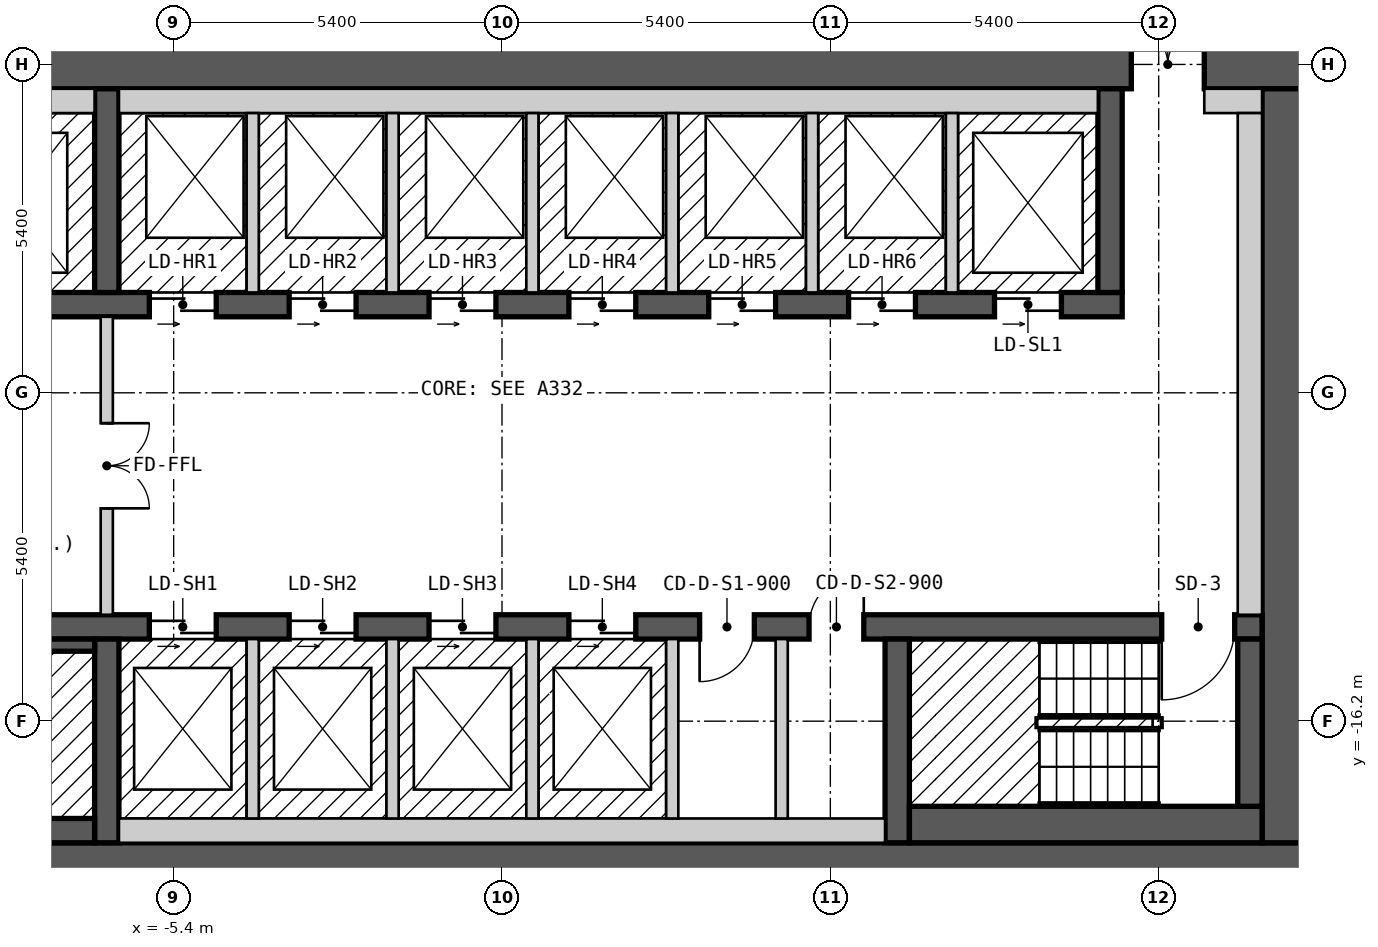
"""IFC4 building model, lengths in metres.
Left out: names, types, materials, properties, quantities, classifications, styles, units other than length and angle.
Written with IfcOpenShell. Run it as: python <this file> out.ifc"""

import sys

from ifc_helpers import new_model, si_unit, direction, frame, frame_2d, origin, place, context, subcontext, project, spatial, rectangle, extrude, element, fill, save


model = new_model("IFC4")
c1 = context("Model", 3, precision=1e-05, world=origin(), true_north=direction((0.0, 1.0)))
c2 = subcontext(c1, "Body", "Model", "MODEL_VIEW")
j1 = project(units=[si_unit("LENGTHUNIT", "METRE"), si_unit("PLANEANGLEUNIT", "RADIAN")], contexts=[c1])
p1 = place(None, origin())
s1 = spatial("IfcSite", under=j1, at=p1, CompositionType="ELEMENT")
p2 = place(p1, origin())
s2 = spatial("IfcBuilding", under=s1, at=p2, CompositionType="ELEMENT")
p3 = place(p2, frame((0.0, 0.0, 111.6)))
s3 = spatial("IfcBuildingStorey", under=s2, at=p3, CompositionType="ELEMENT", Elevation=111.6)
p4 = place(p3, frame((-13.3, -18.6, 0.0), z_axis=(0.0, 0.0, 1.0), x_axis=(1.0, 0.0, 0.0)))
e1 = element("IfcWall", 1, at=p4, inside=s3, PredefinedType="SHEAR", context=c2, shape_type="SweptSolid", body=[
    extrude(rectangle(XDim=26.6, YDim=0.8, at=frame_2d((13.3, 0.0))), origin(), (0.0, 0.0, 1.0), 5.7),
])
p5 = place(p3, frame((-13.3, -5.4, 0.0), z_axis=(0.0, 0.0, 1.0), x_axis=(1.0, 0.0, 0.0)))
e2 = element("IfcWall", 2, at=p5, inside=s3, PredefinedType="SHEAR", context=c2, shape_type="SweptSolid", body=[
    extrude(rectangle(XDim=26.6, YDim=0.8, at=frame_2d((13.3, 0.0))), origin(), (0.0, 0.0, 1.0), 5.7),
])
p6 = place(p5, frame((23.65, 0.0, 0.0)))
e3 = element("IfcOpeningElement", 3, at=p6, cuts=e2, PredefinedType="OPENING", context=c2, shape_type="SweptSolid", body=[
    extrude(rectangle(XDim=1.2, YDim=2.1, at=frame_2d((0.6, 1.05))), frame((0.0, 0.41, 0.0), z_axis=(0.0, -1.0, 0.0), x_axis=(1.0, 0.0, 0.0)), (0.0, 0.0, 1.0), 0.82),
])
p7 = place(p3, frame((12.9, -18.2, 0.0), z_axis=(0.0, 0.0, 1.0), x_axis=(0.0, 1.0, 0.0)))
e4 = element("IfcWall", 4, at=p7, inside=s3, PredefinedType="SHEAR", context=c2, shape_type="SweptSolid", body=[
    extrude(rectangle(XDim=12.4, YDim=0.8, at=frame_2d((6.2, 0.0))), origin(), (0.0, 0.0, 1.0), 5.7),
])
p8 = place(p3, frame((-12.5, -14.65, 0.0), z_axis=(0.0, 0.0, 1.0), x_axis=(1.0, 0.0, 0.0)))
e5 = element("IfcWall", 5, at=p8, inside=s3, PredefinedType="SHEAR", context=c2, shape_type="SweptSolid", body=[
    extrude(rectangle(XDim=25.0, YDim=0.4, at=frame_2d((12.5, 0.0))), origin(), (0.0, 0.0, 1.0), 5.7),
])
p9 = place(p8, frame((6.7, 0.0, 0.0)))
e6 = element("IfcOpeningElement", 6, at=p9, cuts=e5, PredefinedType="OPENING", context=c2, shape_type="SweptSolid", body=[
    extrude(rectangle(XDim=1.1, YDim=2.1, at=frame_2d((0.55, 1.05))), frame((0.0, 0.21, 0.0), z_axis=(0.0, -1.0, 0.0), x_axis=(1.0, 0.0, 0.0)), (0.0, 0.0, 1.0), 0.42),
])
p10 = place(p8, frame((9.0, 0.0, 0.0)))
e7 = element("IfcOpeningElement", 7, at=p10, cuts=e5, PredefinedType="OPENING", context=c2, shape_type="SweptSolid", body=[
    extrude(rectangle(XDim=1.1, YDim=2.1, at=frame_2d((0.55, 1.05))), frame((0.0, 0.21, 0.0), z_axis=(0.0, -1.0, 0.0), x_axis=(1.0, 0.0, 0.0)), (0.0, 0.0, 1.0), 0.42),
])
p11 = place(p8, frame((11.3, 0.0, 0.0)))
e8 = element("IfcOpeningElement", 8, at=p11, cuts=e5, PredefinedType="OPENING", context=c2, shape_type="SweptSolid", body=[
    extrude(rectangle(XDim=1.1, YDim=2.1, at=frame_2d((0.55, 1.05))), frame((0.0, 0.21, 0.0), z_axis=(0.0, -1.0, 0.0), x_axis=(1.0, 0.0, 0.0)), (0.0, 0.0, 1.0), 0.42),
])
p12 = place(p8, frame((13.6, 0.0, 0.0)))
e9 = element("IfcOpeningElement", 9, at=p12, cuts=e5, PredefinedType="OPENING", context=c2, shape_type="SweptSolid", body=[
    extrude(rectangle(XDim=1.1, YDim=2.1, at=frame_2d((0.55, 1.05))), frame((0.0, 0.21, 0.0), z_axis=(0.0, -1.0, 0.0), x_axis=(1.0, 0.0, 0.0)), (0.0, 0.0, 1.0), 0.42),
])
p13 = place(p8, frame((1.7, 0.0, 0.0), z_axis=(0.0, 0.0, 1.0), x_axis=(-1.0, 0.0, 0.0)))
e10 = element("IfcOpeningElement", 10, at=p13, cuts=e5, PredefinedType="OPENING", context=c2, shape_type="SweptSolid", body=[
    extrude(rectangle(XDim=1.2, YDim=2.1, at=frame_2d((0.6, 1.05))), frame((0.0, 0.21, 0.0), z_axis=(0.0, -1.0, 0.0), x_axis=(1.0, 0.0, 0.0)), (0.0, 0.0, 1.0), 0.42),
])
p14 = place(p8, frame((24.55, 0.0, 0.0), z_axis=(0.0, 0.0, 1.0), x_axis=(-1.0, 0.0, 0.0)))
e11 = element("IfcOpeningElement", 11, at=p14, cuts=e5, PredefinedType="OPENING", context=c2, shape_type="SweptSolid", body=[
    extrude(rectangle(XDim=1.2, YDim=2.1, at=frame_2d((0.6, 1.05))), frame((0.0, 0.21, 0.0), z_axis=(0.0, -1.0, 0.0), x_axis=(1.0, 0.0, 0.0)), (0.0, 0.0, 1.0), 0.42),
])
p15 = place(p8, frame((16.65, 0.0, 0.0), z_axis=(0.0, 0.0, 1.0), x_axis=(-1.0, 0.0, 0.0)))
e12 = element("IfcOpeningElement", 12, at=p15, cuts=e5, PredefinedType="OPENING", context=c2, shape_type="SweptSolid", body=[
    extrude(rectangle(XDim=0.9, YDim=2.1, at=frame_2d((0.45, 1.05))), frame((0.0, 0.21, 0.0), z_axis=(0.0, -1.0, 0.0), x_axis=(1.0, 0.0, 0.0)), (0.0, 0.0, 1.0), 0.42),
])
p16 = place(p8, frame((18.45, 0.0, 0.0), z_axis=(0.0, 0.0, 1.0), x_axis=(-1.0, 0.0, 0.0)))
e13 = element("IfcOpeningElement", 13, at=p16, cuts=e5, PredefinedType="OPENING", context=c2, shape_type="SweptSolid", body=[
    extrude(rectangle(XDim=0.9, YDim=2.1, at=frame_2d((0.45, 1.05))), frame((0.0, 0.21, 0.0), z_axis=(0.0, -1.0, 0.0), x_axis=(1.0, 0.0, 0.0)), (0.0, 0.0, 1.0), 0.42),
])
p17 = place(p3, frame((-12.5, -9.35, 0.0), z_axis=(0.0, 0.0, 1.0), x_axis=(1.0, 0.0, 0.0)))
e14 = element("IfcWall", 14, at=p17, inside=s3, PredefinedType="SHEAR", context=c2, shape_type="SweptSolid", body=[
    extrude(rectangle(XDim=22.7, YDim=0.4, at=frame_2d((11.35, 0.0))), origin(), (0.0, 0.0, 1.0), 5.7),
])
p18 = place(p17, frame((1.1, 0.0, 0.0)))
e15 = element("IfcOpeningElement", 15, at=p18, cuts=e14, PredefinedType="OPENING", context=c2, shape_type="SweptSolid", body=[
    extrude(rectangle(XDim=1.1, YDim=2.1, at=frame_2d((0.55, 1.05))), frame((0.0, 0.21, 0.0), z_axis=(0.0, -1.0, 0.0), x_axis=(1.0, 0.0, 0.0)), (0.0, 0.0, 1.0), 0.42),
])
p19 = place(p17, frame((3.9, 0.0, 0.0)))
e16 = element("IfcOpeningElement", 16, at=p19, cuts=e14, PredefinedType="OPENING", context=c2, shape_type="SweptSolid", body=[
    extrude(rectangle(XDim=1.1, YDim=2.1, at=frame_2d((0.55, 1.05))), frame((0.0, 0.21, 0.0), z_axis=(0.0, -1.0, 0.0), x_axis=(1.0, 0.0, 0.0)), (0.0, 0.0, 1.0), 0.42),
])
p20 = place(p17, frame((6.7, 0.0, 0.0)))
e17 = element("IfcOpeningElement", 17, at=p20, cuts=e14, PredefinedType="OPENING", context=c2, shape_type="SweptSolid", body=[
    extrude(rectangle(XDim=1.1, YDim=2.1, at=frame_2d((0.55, 1.05))), frame((0.0, 0.21, 0.0), z_axis=(0.0, -1.0, 0.0), x_axis=(1.0, 0.0, 0.0)), (0.0, 0.0, 1.0), 0.42),
])
p21 = place(p17, frame((9.0, 0.0, 0.0)))
e18 = element("IfcOpeningElement", 18, at=p21, cuts=e14, PredefinedType="OPENING", context=c2, shape_type="SweptSolid", body=[
    extrude(rectangle(XDim=1.1, YDim=2.1, at=frame_2d((0.55, 1.05))), frame((0.0, 0.21, 0.0), z_axis=(0.0, -1.0, 0.0), x_axis=(1.0, 0.0, 0.0)), (0.0, 0.0, 1.0), 0.42),
])
p22 = place(p17, frame((11.3, 0.0, 0.0)))
e19 = element("IfcOpeningElement", 19, at=p22, cuts=e14, PredefinedType="OPENING", context=c2, shape_type="SweptSolid", body=[
    extrude(rectangle(XDim=1.1, YDim=2.1, at=frame_2d((0.55, 1.05))), frame((0.0, 0.21, 0.0), z_axis=(0.0, -1.0, 0.0), x_axis=(1.0, 0.0, 0.0)), (0.0, 0.0, 1.0), 0.42),
])
p23 = place(p17, frame((13.6, 0.0, 0.0)))
e20 = element("IfcOpeningElement", 20, at=p23, cuts=e14, PredefinedType="OPENING", context=c2, shape_type="SweptSolid", body=[
    extrude(rectangle(XDim=1.1, YDim=2.1, at=frame_2d((0.55, 1.05))), frame((0.0, 0.21, 0.0), z_axis=(0.0, -1.0, 0.0), x_axis=(1.0, 0.0, 0.0)), (0.0, 0.0, 1.0), 0.42),
])
p24 = place(p17, frame((15.9, 0.0, 0.0)))
e21 = element("IfcOpeningElement", 21, at=p24, cuts=e14, PredefinedType="OPENING", context=c2, shape_type="SweptSolid", body=[
    extrude(rectangle(XDim=1.1, YDim=2.1, at=frame_2d((0.55, 1.05))), frame((0.0, 0.21, 0.0), z_axis=(0.0, -1.0, 0.0), x_axis=(1.0, 0.0, 0.0)), (0.0, 0.0, 1.0), 0.42),
])
p25 = place(p17, frame((18.2, 0.0, 0.0)))
e22 = element("IfcOpeningElement", 22, at=p25, cuts=e14, PredefinedType="OPENING", context=c2, shape_type="SweptSolid", body=[
    extrude(rectangle(XDim=1.1, YDim=2.1, at=frame_2d((0.55, 1.05))), frame((0.0, 0.21, 0.0), z_axis=(0.0, -1.0, 0.0), x_axis=(1.0, 0.0, 0.0)), (0.0, 0.0, 1.0), 0.42),
])
p26 = place(p17, frame((20.6, 0.0, 0.0)))
e23 = element("IfcOpeningElement", 23, at=p26, cuts=e14, PredefinedType="OPENING", context=c2, shape_type="SweptSolid", body=[
    extrude(rectangle(XDim=1.1, YDim=2.1, at=frame_2d((0.55, 1.05))), frame((0.0, 0.21, 0.0), z_axis=(0.0, -1.0, 0.0), x_axis=(1.0, 0.0, 0.0)), (0.0, 0.0, 1.0), 0.42),
])
for number, where, z_axis, x_axis in (
    (24, (-6.5, -18.2, 0.0), (0.0, 0.0, 1.0), (0.0, 1.0, 0.0)),
    (25, (6.5, -18.2, 0.0), (0.0, 0.0, 1.0), (0.0, 1.0, 0.0)),
    (26, (-6.5, -9.15, 0.0), (0.0, 0.0, 1.0), (0.0, 1.0, 0.0)),
    (27, (10.0, -9.15, 0.0), (0.0, 0.0, 1.0), (0.0, 1.0, 0.0)),
):
    element("IfcWall", number, at=place(p3, frame(where, z_axis=z_axis, x_axis=x_axis)), inside=s3, PredefinedType="SHEAR", context=c2, shape_type="SweptSolid", body=[
        extrude(rectangle(XDim=3.35, YDim=0.4, at=frame_2d((1.675, 0.0))), origin(), (0.0, 0.0, 1.0), 5.7),
    ])
for number, where, z_axis, x_axis in (
    (28, (-12.1, -18.0, 0.0), (0.0, 0.0, 1.0), (1.0, 0.0, 0.0)),
    (29, (-12.1, -6.0, 0.0), (0.0, 0.0, 1.0), (1.0, 0.0, 0.0)),
):
    element("IfcWall", number, at=place(p3, frame(where, z_axis=z_axis, x_axis=x_axis)), inside=s3, PredefinedType="SOLIDWALL", context=c2, shape_type="SweptSolid", body=[
        extrude(rectangle(XDim=5.4, YDim=0.4, at=frame_2d((2.7, 0.0))), origin(), (0.0, 0.0, 1.0), 5.7),
    ])
p27 = place(p3, frame((-10.8, -14.95, 0.0), z_axis=(0.0, 0.0, 1.0), x_axis=(1.0, 0.0, 0.0)))
e30 = element("IfcWall", 30, at=p27, inside=s3, PredefinedType="SOLIDWALL", context=c2, shape_type="SweptSolid", body=[
    extrude(rectangle(XDim=4.1, YDim=0.2, at=frame_2d((2.05, 0.0))), origin(), (0.0, 0.0, 1.0), 5.7),
])
p28 = place(p3, frame((-6.5, -14.45, 0.0), z_axis=(0.0, 0.0, 1.0), x_axis=(0.0, 1.0, 0.0)))
e31 = element("IfcWall", 31, at=p28, inside=s3, PredefinedType="PARTITIONING", context=c2, shape_type="SweptSolid", body=[
    extrude(rectangle(XDim=4.9, YDim=0.2, at=frame_2d((2.45, 0.0))), origin(), (0.0, 0.0, 1.0), 5.7),
])
p29 = place(p28, frame((3.15, 0.0, 0.0), z_axis=(0.0, 0.0, 1.0), x_axis=(-1.0, 0.0, 0.0)))
e32 = element("IfcOpeningElement", 32, at=p29, cuts=e31, PredefinedType="OPENING", context=c2, shape_type="SweptSolid", body=[
    extrude(rectangle(XDim=1.4, YDim=2.1, at=frame_2d((0.7, 1.05))), frame((0.0, 0.11, 0.0), z_axis=(0.0, -1.0, 0.0), x_axis=(1.0, 0.0, 0.0)), (0.0, 0.0, 1.0), 0.22),
])
p30 = place(p3, frame((-6.3, -18.0, 0.0), z_axis=(0.0, 0.0, 1.0), x_axis=(1.0, 0.0, 0.0)))
e33 = element("IfcWall", 33, at=p30, inside=s3, PredefinedType="SOLIDWALL", context=c2, shape_type="SweptSolid", body=[
    extrude(rectangle(XDim=12.6, YDim=0.4, at=frame_2d((6.3, 0.0))), origin(), (0.0, 0.0, 1.0), 5.7),
])
p31 = place(p3, frame((-6.3, -6.0, 0.0), z_axis=(0.0, 0.0, 1.0), x_axis=(1.0, 0.0, 0.0)))
e34 = element("IfcWall", 34, at=p31, inside=s3, PredefinedType="SOLIDWALL", context=c2, shape_type="SweptSolid", body=[
    extrude(rectangle(XDim=16.1, YDim=0.4, at=frame_2d((8.05, 0.0))), origin(), (0.0, 0.0, 1.0), 5.7),
])
for number, where, z_axis, x_axis in (
    (35, (-4.1, -17.8, 0.0), (0.0, 0.0, 1.0), (0.0, 1.0, 0.0)),
    (36, (-4.1, -9.15, 0.0), (0.0, 0.0, 1.0), (0.0, 1.0, 0.0)),
    (37, (-1.8, -17.8, 0.0), (0.0, 0.0, 1.0), (0.0, 1.0, 0.0)),
    (38, (-1.8, -9.15, 0.0), (0.0, 0.0, 1.0), (0.0, 1.0, 0.0)),
    (39, (0.5, -17.8, 0.0), (0.0, 0.0, 1.0), (0.0, 1.0, 0.0)),
    (40, (0.5, -9.15, 0.0), (0.0, 0.0, 1.0), (0.0, 1.0, 0.0)),
    (41, (2.8, -17.8, 0.0), (0.0, 0.0, 1.0), (0.0, 1.0, 0.0)),
    (42, (2.8, -9.15, 0.0), (0.0, 0.0, 1.0), (0.0, 1.0, 0.0)),
):
    element("IfcWall", number, at=place(p3, frame(where, z_axis=z_axis, x_axis=x_axis)), inside=s3, PredefinedType="SOLIDWALL", context=c2, shape_type="SweptSolid", body=[
        extrude(rectangle(XDim=2.95, YDim=0.2, at=frame_2d((1.475, 0.0))), origin(), (0.0, 0.0, 1.0), 5.7),
    ])
p32 = place(p3, frame((4.6, -17.8, 0.0), z_axis=(0.0, 0.0, 1.0), x_axis=(0.0, 1.0, 0.0)))
e43 = element("IfcWall", 43, at=p32, inside=s3, PredefinedType="PARTITIONING", context=c2, shape_type="SweptSolid", body=[
    extrude(rectangle(XDim=2.95, YDim=0.2, at=frame_2d((1.475, 0.0))), origin(), (0.0, 0.0, 1.0), 5.7),
])
p33 = place(p3, frame((5.1, -9.15, 0.0), z_axis=(0.0, 0.0, 1.0), x_axis=(0.0, 1.0, 0.0)))
e44 = element("IfcWall", 44, at=p33, inside=s3, PredefinedType="SOLIDWALL", context=c2, shape_type="SweptSolid", body=[
    extrude(rectangle(XDim=2.95, YDim=0.2, at=frame_2d((1.475, 0.0))), origin(), (0.0, 0.0, 1.0), 5.7),
])
p34 = place(p3, frame((6.7, -17.9, 0.0), z_axis=(0.0, 0.0, 1.0), x_axis=(1.0, 0.0, 0.0)))
e45 = element("IfcWall", 45, at=p34, inside=s3, PredefinedType="SOLIDWALL", context=c2, shape_type="SweptSolid", body=[
    extrude(rectangle(XDim=5.8, YDim=0.6, at=frame_2d((2.9, 0.0))), origin(), (0.0, 0.0, 1.0), 5.7),
])
p35 = place(p3, frame((7.4, -9.15, 0.0), z_axis=(0.0, 0.0, 1.0), x_axis=(0.0, 1.0, 0.0)))
e46 = element("IfcWall", 46, at=p35, inside=s3, PredefinedType="SOLIDWALL", context=c2, shape_type="SweptSolid", body=[
    extrude(rectangle(XDim=2.95, YDim=0.2, at=frame_2d((1.475, 0.0))), origin(), (0.0, 0.0, 1.0), 5.7),
])
p36 = place(p3, frame((11.55, -6.0, 0.0), z_axis=(0.0, 0.0, 1.0), x_axis=(1.0, 0.0, 0.0)))
e47 = element("IfcWall", 47, at=p36, inside=s3, PredefinedType="PARTITIONING", context=c2, shape_type="SweptSolid", body=[
    extrude(rectangle(XDim=0.95, YDim=0.4, at=frame_2d((0.475, 0.0))), origin(), (0.0, 0.0, 1.0), 5.7),
])
p37 = place(p3, frame((12.3, -17.6, 0.0), z_axis=(0.0, 0.0, 1.0), x_axis=(0.0, 1.0, 0.0)))
e48 = element("IfcWall", 48, at=p37, inside=s3, PredefinedType="SOLIDWALL", context=c2, shape_type="SweptSolid", body=[
    extrude(rectangle(XDim=2.75, YDim=0.4, at=frame_2d((1.375, 0.0))), origin(), (0.0, 0.0, 1.0), 5.7),
])
p38 = place(p3, frame((12.3, -14.45, 0.0), z_axis=(0.0, 0.0, 1.0), x_axis=(0.0, 1.0, 0.0)))
e49 = element("IfcWall", 49, at=p38, inside=s3, PredefinedType="PARTITIONING", context=c2, shape_type="SweptSolid", body=[
    extrude(rectangle(XDim=8.25, YDim=0.4, at=frame_2d((4.125, 0.0))), origin(), (0.0, 0.0, 1.0), 5.7),
])
p39 = place(p20, origin())
e50 = element("IfcDoor", 50, at=p39, inside=s3, OperationType="DOUBLE_DOOR_SLIDING", PredefinedType="DOOR", context=c2, shape_type="SweptSolid", body=[
    extrude(rectangle(XDim=1.1, YDim=2.1, at=frame_2d((0.55, 1.05))), frame((0.0, 0.025, 0.0), z_axis=(0.0, -1.0, 0.0), x_axis=(1.0, 0.0, 0.0)), (0.0, 0.0, 1.0), 0.05),
])
fill(e17, e50)
p40 = place(p21, origin())
e51 = element("IfcDoor", 51, at=p40, inside=s3, OperationType="DOUBLE_DOOR_SLIDING", PredefinedType="DOOR", context=c2, shape_type="SweptSolid", body=[
    extrude(rectangle(XDim=1.1, YDim=2.1, at=frame_2d((0.55, 1.05))), frame((0.0, 0.025, 0.0), z_axis=(0.0, -1.0, 0.0), x_axis=(1.0, 0.0, 0.0)), (0.0, 0.0, 1.0), 0.05),
])
fill(e18, e51)
p41 = place(p22, origin())
e52 = element("IfcDoor", 52, at=p41, inside=s3, OperationType="DOUBLE_DOOR_SLIDING", PredefinedType="DOOR", context=c2, shape_type="SweptSolid", body=[
    extrude(rectangle(XDim=1.1, YDim=2.1, at=frame_2d((0.55, 1.05))), frame((0.0, 0.025, 0.0), z_axis=(0.0, -1.0, 0.0), x_axis=(1.0, 0.0, 0.0)), (0.0, 0.0, 1.0), 0.05),
])
fill(e19, e52)
p42 = place(p23, origin())
e53 = element("IfcDoor", 53, at=p42, inside=s3, OperationType="DOUBLE_DOOR_SLIDING", PredefinedType="DOOR", context=c2, shape_type="SweptSolid", body=[
    extrude(rectangle(XDim=1.1, YDim=2.1, at=frame_2d((0.55, 1.05))), frame((0.0, 0.025, 0.0), z_axis=(0.0, -1.0, 0.0), x_axis=(1.0, 0.0, 0.0)), (0.0, 0.0, 1.0), 0.05),
])
fill(e20, e53)
p43 = place(p24, origin())
e54 = element("IfcDoor", 54, at=p43, inside=s3, OperationType="DOUBLE_DOOR_SLIDING", PredefinedType="DOOR", context=c2, shape_type="SweptSolid", body=[
    extrude(rectangle(XDim=1.1, YDim=2.1, at=frame_2d((0.55, 1.05))), frame((0.0, 0.025, 0.0), z_axis=(0.0, -1.0, 0.0), x_axis=(1.0, 0.0, 0.0)), (0.0, 0.0, 1.0), 0.05),
])
fill(e21, e54)
p44 = place(p25, origin())
e55 = element("IfcDoor", 55, at=p44, inside=s3, OperationType="DOUBLE_DOOR_SLIDING", PredefinedType="DOOR", context=c2, shape_type="SweptSolid", body=[
    extrude(rectangle(XDim=1.1, YDim=2.1, at=frame_2d((0.55, 1.05))), frame((0.0, 0.025, 0.0), z_axis=(0.0, -1.0, 0.0), x_axis=(1.0, 0.0, 0.0)), (0.0, 0.0, 1.0), 0.05),
])
fill(e22, e55)
p45 = place(p26, origin())
e56 = element("IfcDoor", 56, at=p45, inside=s3, OperationType="DOUBLE_DOOR_SLIDING", PredefinedType="DOOR", context=c2, shape_type="SweptSolid", body=[
    extrude(rectangle(XDim=1.1, YDim=2.1, at=frame_2d((0.55, 1.05))), frame((0.0, 0.025, 0.0), z_axis=(0.0, -1.0, 0.0), x_axis=(1.0, 0.0, 0.0)), (0.0, 0.0, 1.0), 0.05),
])
fill(e23, e56)
p46 = place(p9, origin())
e57 = element("IfcDoor", 57, at=p46, inside=s3, OperationType="DOUBLE_DOOR_SLIDING", PredefinedType="DOOR", context=c2, shape_type="SweptSolid", body=[
    extrude(rectangle(XDim=1.1, YDim=2.1, at=frame_2d((0.55, 1.05))), frame((0.0, 0.025, 0.0), z_axis=(0.0, -1.0, 0.0), x_axis=(1.0, 0.0, 0.0)), (0.0, 0.0, 1.0), 0.05),
])
fill(e6, e57)
p47 = place(p10, origin())
e58 = element("IfcDoor", 58, at=p47, inside=s3, OperationType="DOUBLE_DOOR_SLIDING", PredefinedType="DOOR", context=c2, shape_type="SweptSolid", body=[
    extrude(rectangle(XDim=1.1, YDim=2.1, at=frame_2d((0.55, 1.05))), frame((0.0, 0.025, 0.0), z_axis=(0.0, -1.0, 0.0), x_axis=(1.0, 0.0, 0.0)), (0.0, 0.0, 1.0), 0.05),
])
fill(e7, e58)
p48 = place(p11, origin())
e59 = element("IfcDoor", 59, at=p48, inside=s3, OperationType="DOUBLE_DOOR_SLIDING", PredefinedType="DOOR", context=c2, shape_type="SweptSolid", body=[
    extrude(rectangle(XDim=1.1, YDim=2.1, at=frame_2d((0.55, 1.05))), frame((0.0, 0.025, 0.0), z_axis=(0.0, -1.0, 0.0), x_axis=(1.0, 0.0, 0.0)), (0.0, 0.0, 1.0), 0.05),
])
fill(e8, e59)
p49 = place(p12, origin())
e60 = element("IfcDoor", 60, at=p49, inside=s3, OperationType="DOUBLE_DOOR_SLIDING", PredefinedType="DOOR", context=c2, shape_type="SweptSolid", body=[
    extrude(rectangle(XDim=1.1, YDim=2.1, at=frame_2d((0.55, 1.05))), frame((0.0, 0.025, 0.0), z_axis=(0.0, -1.0, 0.0), x_axis=(1.0, 0.0, 0.0)), (0.0, 0.0, 1.0), 0.05),
])
fill(e9, e60)
p50 = place(p14, origin())
e61 = element("IfcDoor", 61, at=p50, inside=s3, OperationType="SINGLE_SWING_RIGHT", PredefinedType="DOOR", context=c2, shape_type="SweptSolid", body=[
    extrude(rectangle(XDim=1.2, YDim=2.1, at=frame_2d((0.6, 1.05))), frame((0.0, 0.025, 0.0), z_axis=(0.0, -1.0, 0.0), x_axis=(1.0, 0.0, 0.0)), (0.0, 0.0, 1.0), 0.05),
])
fill(e11, e61)
p51 = place(p29, origin())
e62 = element("IfcDoor", 62, at=p51, inside=s3, OperationType="DOUBLE_DOOR_SINGLE_SWING", PredefinedType="DOOR", context=c2, shape_type="SweptSolid", body=[
    extrude(rectangle(XDim=1.4, YDim=2.1, at=frame_2d((0.7, 1.05))), frame((0.0, 0.025, 0.0), z_axis=(0.0, -1.0, 0.0), x_axis=(1.0, 0.0, 0.0)), (0.0, 0.0, 1.0), 0.05),
])
fill(e32, e62)
p52 = place(p6, origin())
e63 = element("IfcDoor", 63, at=p52, inside=s3, OperationType="DOUBLE_DOOR_SINGLE_SWING", PredefinedType="DOOR", context=c2, shape_type="SweptSolid", body=[
    extrude(rectangle(XDim=1.2, YDim=2.1, at=frame_2d((0.6, 1.05))), frame((0.0, 0.025, 0.0), z_axis=(0.0, -1.0, 0.0), x_axis=(1.0, 0.0, 0.0)), (0.0, 0.0, 1.0), 0.05),
])
fill(e3, e63)
p53 = place(p15, origin())
e64 = element("IfcDoor", 64, at=p53, inside=s3, OperationType="SINGLE_SWING_RIGHT", PredefinedType="DOOR", context=c2, shape_type="SweptSolid", body=[
    extrude(rectangle(XDim=0.9, YDim=2.1, at=frame_2d((0.45, 1.05))), frame((0.0, 0.025, 0.0), z_axis=(0.0, -1.0, 0.0), x_axis=(1.0, 0.0, 0.0)), (0.0, 0.0, 1.0), 0.05),
])
fill(e12, e64)
p54 = place(p16, origin())
e65 = element("IfcDoor", 65, at=p54, inside=s3, OperationType="SINGLE_SWING_LEFT", PredefinedType="DOOR", context=c2, shape_type="SweptSolid", body=[
    extrude(rectangle(XDim=0.9, YDim=2.1, at=frame_2d((0.45, 1.05))), frame((0.0, 0.025, 0.0), z_axis=(0.0, -1.0, 0.0), x_axis=(1.0, 0.0, 0.0)), (0.0, 0.0, 1.0), 0.05),
])
fill(e13, e65)
save(model, sys.argv[1])
